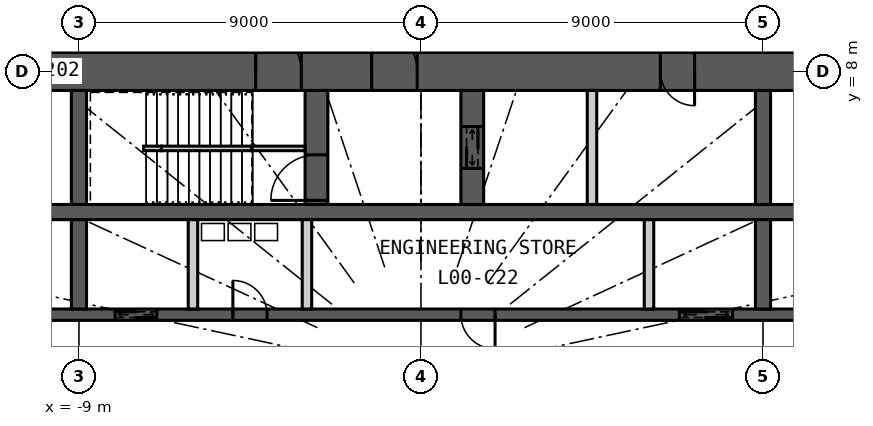
"""IFC4 building model, lengths in metres.
Left out: names, types, materials, properties, quantities, classifications, styles, units other than length and angle.
Written with IfcOpenShell. Run it as: python <this file> out.ifc"""

import sys

from ifc_helpers import new_model, si_unit, direction, frame, frame_2d, origin, place, context, subcontext, project, spatial, rectangle, extrude, element, fill, save


model = new_model("IFC4")
c1 = context("Model", 3, precision=1e-05, world=origin(), true_north=direction((0.0, 1.0)))
c2 = subcontext(c1, "Body", "Model", "MODEL_VIEW")
j1 = project(units=[si_unit("LENGTHUNIT", "METRE"), si_unit("PLANEANGLEUNIT", "RADIAN")], contexts=[c1])
p1 = place(None, origin())
s1 = spatial("IfcSite", under=j1, at=p1, CompositionType="ELEMENT")
p2 = place(p1, origin())
s2 = spatial("IfcBuilding", under=s1, at=p2, CompositionType="ELEMENT")
p3 = place(p2, origin())
s3 = spatial("IfcBuildingStorey", under=s2, at=p3, CompositionType="ELEMENT", Elevation=0.0)
p4 = place(p3, frame((-12.5, 8.0, 0.0), z_axis=(0.0, 0.0, 1.0), x_axis=(1.0, 0.0, 0.0)))
e1 = element("IfcWall", 1, at=p4, inside=s3, PredefinedType="SHEAR", context=c2, shape_type="SweptSolid", body=[
    extrude(rectangle(XDim=25.0, YDim=1.0, at=frame_2d((12.5, 0.0))), origin(), (0.0, 0.0, 1.0), 7.2),
])
p5 = place(p4, frame((11.2, 0.0, 0.0)))
e2 = element("IfcOpeningElement", 2, at=p5, cuts=e1, PredefinedType="OPENING", context=c2, shape_type="SweptSolid", body=[
    extrude(rectangle(XDim=1.2, YDim=2.2, at=frame_2d((0.6, 1.1))), frame((0.0, 0.51, 0.0), z_axis=(0.0, -1.0, 0.0), x_axis=(1.0, 0.0, 0.0)), (0.0, 0.0, 1.0), 1.02),
])
p6 = place(p4, frame((8.15, 0.0, 0.0)))
e3 = element("IfcOpeningElement", 3, at=p6, cuts=e1, PredefinedType="OPENING", context=c2, shape_type="SweptSolid", body=[
    extrude(rectangle(XDim=1.2, YDim=2.2, at=frame_2d((0.6, 1.1))), frame((0.0, 0.51, 0.0), z_axis=(0.0, -1.0, 0.0), x_axis=(1.0, 0.0, 0.0)), (0.0, 0.0, 1.0), 1.02),
])
p7 = place(p4, frame((18.8, 0.0, 0.0)))
e4 = element("IfcOpeningElement", 4, at=p7, cuts=e1, PredefinedType="OPENING", context=c2, shape_type="SweptSolid", body=[
    extrude(rectangle(XDim=0.9, YDim=2.2, at=frame_2d((0.45, 1.1))), frame((0.0, 0.51, 0.0), z_axis=(0.0, -1.0, 0.0), x_axis=(1.0, 0.0, 0.0)), (0.0, 0.0, 1.0), 1.02),
])
p8 = place(p3, frame((-11.5, 4.3, 0.0), z_axis=(0.0, 0.0, 1.0), x_axis=(1.0, 0.0, 0.0)))
e5 = element("IfcWall", 5, at=p8, inside=s3, PredefinedType="SHEAR", context=c2, shape_type="SweptSolid", body=[
    extrude(rectangle(XDim=23.0, YDim=0.4, at=frame_2d((11.5, 0.0))), origin(), (0.0, 0.0, 1.0), 7.2),
])
p9 = place(p3, frame((-11.5, 1.6, 0.0), z_axis=(0.0, 0.0, 1.0), x_axis=(1.0, 0.0, 0.0)))
e6 = element("IfcWall", 6, at=p9, inside=s3, PredefinedType="SHEAR", context=c2, shape_type="SweptSolid", body=[
    extrude(rectangle(XDim=23.0, YDim=0.3, at=frame_2d((11.5, 0.0))), origin(), (0.0, 0.0, 1.0), 7.2),
])
p10 = place(p9, frame((0.45, 0.0, 0.0)))
e7 = element("IfcOpeningElement", 7, at=p10, cuts=e6, PredefinedType="OPENING", context=c2, shape_type="SweptSolid", body=[
    extrude(rectangle(XDim=1.1, YDim=2.2, at=frame_2d((0.55, 1.1))), frame((0.0, 0.16, 0.0), z_axis=(0.0, -1.0, 0.0), x_axis=(1.0, 0.0, 0.0)), (0.0, 0.0, 1.0), 0.32),
])
p11 = place(p9, frame((3.45, 0.0, 0.0)))
e8 = element("IfcOpeningElement", 8, at=p11, cuts=e6, PredefinedType="OPENING", context=c2, shape_type="SweptSolid", body=[
    extrude(rectangle(XDim=1.1, YDim=2.2, at=frame_2d((0.55, 1.1))), frame((0.0, 0.16, 0.0), z_axis=(0.0, -1.0, 0.0), x_axis=(1.0, 0.0, 0.0)), (0.0, 0.0, 1.0), 0.32),
])
p12 = place(p9, frame((18.3, 0.0, 0.0)))
e9 = element("IfcOpeningElement", 9, at=p12, cuts=e6, PredefinedType="OPENING", context=c2, shape_type="SweptSolid", body=[
    extrude(rectangle(XDim=1.4, YDim=2.4, at=frame_2d((0.7, 1.2))), frame((0.0, 0.16, 0.0), z_axis=(0.0, -1.0, 0.0), x_axis=(1.0, 0.0, 0.0)), (0.0, 0.0, 1.0), 0.32),
])
p13 = place(p9, frame((21.45, 0.0, 0.0)))
e10 = element("IfcOpeningElement", 10, at=p13, cuts=e6, PredefinedType="OPENING", context=c2, shape_type="SweptSolid", body=[
    extrude(rectangle(XDim=1.1, YDim=2.2, at=frame_2d((0.55, 1.1))), frame((0.0, 0.16, 0.0), z_axis=(0.0, -1.0, 0.0), x_axis=(1.0, 0.0, 0.0)), (0.0, 0.0, 1.0), 0.32),
])
p14 = place(p9, frame((6.55, 0.0, 0.0)))
e11 = element("IfcOpeningElement", 11, at=p14, cuts=e6, PredefinedType="OPENING", context=c2, shape_type="SweptSolid", body=[
    extrude(rectangle(XDim=0.9, YDim=2.2, at=frame_2d((0.45, 1.1))), frame((0.0, 0.16, 0.0), z_axis=(0.0, -1.0, 0.0), x_axis=(1.0, 0.0, 0.0)), (0.0, 0.0, 1.0), 0.32),
])
p15 = place(p9, frame((12.55, 0.0, 0.0)))
e12 = element("IfcOpeningElement", 12, at=p15, cuts=e6, PredefinedType="OPENING", context=c2, shape_type="SweptSolid", body=[
    extrude(rectangle(XDim=0.9, YDim=2.2, at=frame_2d((0.45, 1.1))), frame((0.0, 0.16, 0.0), z_axis=(0.0, -1.0, 0.0), x_axis=(1.0, 0.0, 0.0)), (0.0, 0.0, 1.0), 0.32),
])
p16 = place(p3, frame((-9.0, 4.5, 0.0), z_axis=(0.0, 0.0, 1.0), x_axis=(0.0, 1.0, 0.0)))
e13 = element("IfcWall", 13, at=p16, inside=s3, PredefinedType="SHEAR", context=c2, shape_type="SweptSolid", body=[
    extrude(rectangle(XDim=3.0, YDim=0.4, at=frame_2d((1.5, 0.0))), origin(), (0.0, 0.0, 1.0), 7.2),
])
p17 = place(p3, frame((-9.0, 1.75, 0.0), z_axis=(0.0, 0.0, 1.0), x_axis=(0.0, 1.0, 0.0)))
e14 = element("IfcWall", 14, at=p17, inside=s3, PredefinedType="SHEAR", context=c2, shape_type="SweptSolid", body=[
    extrude(rectangle(XDim=2.35, YDim=0.4, at=frame_2d((1.175, 0.0))), origin(), (0.0, 0.0, 1.0), 7.2),
])
p18 = place(p3, frame((9.0, 4.5, 0.0), z_axis=(0.0, 0.0, 1.0), x_axis=(0.0, 1.0, 0.0)))
e15 = element("IfcWall", 15, at=p18, inside=s3, PredefinedType="SHEAR", context=c2, shape_type="SweptSolid", body=[
    extrude(rectangle(XDim=3.0, YDim=0.4, at=frame_2d((1.5, 0.0))), origin(), (0.0, 0.0, 1.0), 7.2),
])
p19 = place(p3, frame((9.0, 1.75, 0.0), z_axis=(0.0, 0.0, 1.0), x_axis=(0.0, 1.0, 0.0)))
e16 = element("IfcWall", 16, at=p19, inside=s3, PredefinedType="SHEAR", context=c2, shape_type="SweptSolid", body=[
    extrude(rectangle(XDim=2.35, YDim=0.4, at=frame_2d((1.175, 0.0))), origin(), (0.0, 0.0, 1.0), 7.2),
])
p20 = place(p3, frame((-2.75, 7.5, 0.0), z_axis=(0.0, 0.0, 1.0), x_axis=(0.0, -1.0, 0.0)))
e17 = element("IfcWall", 17, at=p20, inside=s3, PredefinedType="SHEAR", context=c2, shape_type="SweptSolid", body=[
    extrude(rectangle(XDim=3.0, YDim=0.6, at=frame_2d((1.5, 0.0))), origin(), (0.0, 0.0, 1.0), 7.2),
])
p21 = place(p20, frame((1.692, 0.0, 0.0)))
e18 = element("IfcOpeningElement", 18, at=p21, cuts=e17, PredefinedType="OPENING", context=c2, shape_type="SweptSolid", body=[
    extrude(rectangle(XDim=1.2, YDim=2.2, at=frame_2d((0.6, 1.1))), frame((0.0, 0.31, 0.0), z_axis=(0.0, -1.0, 0.0), x_axis=(1.0, 0.0, 0.0)), (0.0, 0.0, 1.0), 0.62),
])
p22 = place(p3, frame((1.35, 4.5, 0.0), z_axis=(0.0, 0.0, 1.0), x_axis=(0.0, 1.0, 0.0)))
e19 = element("IfcWall", 19, at=p22, inside=s3, PredefinedType="SHEAR", context=c2, shape_type="SweptSolid", body=[
    extrude(rectangle(XDim=3.0, YDim=0.6, at=frame_2d((1.5, 0.0))), origin(), (0.0, 0.0, 1.0), 7.2),
])
p23 = place(p22, frame((0.95, 0.0, 0.0)))
e20 = element("IfcOpeningElement", 20, at=p23, cuts=e19, PredefinedType="OPENING", context=c2, shape_type="SweptSolid", body=[
    extrude(rectangle(XDim=1.1, YDim=2.2, at=frame_2d((0.55, 1.1))), frame((0.0, 0.31, 0.0), z_axis=(0.0, -1.0, 0.0), x_axis=(1.0, 0.0, 0.0)), (0.0, 0.0, 1.0), 0.62),
])
p24 = place(p3, frame((4.5, 4.5, 0.0), z_axis=(0.0, 0.0, 1.0), x_axis=(0.0, 1.0, 0.0)))
e21 = element("IfcWall", 21, at=p24, inside=s3, PredefinedType="PARTITIONING", context=c2, shape_type="SweptSolid", body=[
    extrude(rectangle(XDim=3.0, YDim=0.25, at=frame_2d((1.5, 0.0))), origin(), (0.0, 0.0, 1.0), 7.2),
])
for number, where, z_axis, x_axis in (
    (22, (-6.0, 1.75, 0.0), (0.0, 0.0, 1.0), (0.0, 1.0, 0.0)),
    (23, (-3.0, 1.75, 0.0), (0.0, 0.0, 1.0), (0.0, 1.0, 0.0)),
    (24, (6.0, 1.75, 0.0), (0.0, 0.0, 1.0), (0.0, 1.0, 0.0)),
):
    element("IfcWall", number, at=place(p3, frame(where, z_axis=z_axis, x_axis=x_axis)), inside=s3, PredefinedType="PARTITIONING", context=c2, shape_type="SweptSolid", body=[
        extrude(rectangle(XDim=2.35, YDim=0.25, at=frame_2d((1.175, 0.0))), origin(), (0.0, 0.0, 1.0), 7.2),
    ])
p25 = place(p3, frame((-6.83, 5.975, -0.5), z_axis=(0.0, 0.0, 1.0), x_axis=(1.0, 0.0, 0.0)))
e25 = element("IfcWall", 25, at=p25, inside=s3, PredefinedType="PARTITIONING", context=c2, shape_type="SweptSolid", body=[
    extrude(rectangle(XDim=2.38, YDim=0.12, at=frame_2d((1.19, 0.0))), origin(), (0.0, 0.0, 1.0), 4.3),
])
p26 = place(p3, frame((-4.45, 5.975, 0.0), z_axis=(0.0, 0.0, 1.0), x_axis=(1.0, 0.0, 0.0)))
e26 = element("IfcWall", 26, at=p26, inside=s3, PredefinedType="PARTITIONING", context=c2, shape_type="SweptSolid", body=[
    extrude(rectangle(XDim=1.4, YDim=0.12, at=frame_2d((0.7, 0.0))), origin(), (0.0, 0.0, 1.0), 3.35),
])
p27 = place(p3, frame((-7.3, 5.975, 1.129), z_axis=(0.0, 0.0, 1.0), x_axis=(1.0, 0.0, 0.0)))
e27 = element("IfcWall", 27, at=p27, inside=s3, PredefinedType="PARTITIONING", context=c2, shape_type="SweptSolid", body=[
    extrude(rectangle(XDim=0.47, YDim=0.12, at=frame_2d((0.235, 0.0))), origin(), (0.0, 0.0, 1.0), 2.671),
])
p28 = place(p5, origin())
e28 = element("IfcDoor", 28, at=p28, inside=s3, OperationType="SINGLE_SWING_LEFT", PredefinedType="DOOR", context=c2, shape_type="SweptSolid", body=[
    extrude(rectangle(XDim=1.2, YDim=2.2, at=frame_2d((0.6, 1.1))), frame((0.0, 0.025, 0.0), z_axis=(0.0, -1.0, 0.0), x_axis=(1.0, 0.0, 0.0)), (0.0, 0.0, 1.0), 0.05),
])
fill(e2, e28)
p29 = place(p21, origin())
e29 = element("IfcDoor", 29, at=p29, inside=s3, OperationType="SINGLE_SWING_RIGHT", PredefinedType="DOOR", context=c2, shape_type="SweptSolid", body=[
    extrude(rectangle(XDim=1.2, YDim=2.2, at=frame_2d((0.6, 1.1))), frame((0.0, 0.025, 0.0), z_axis=(0.0, -1.0, 0.0), x_axis=(1.0, 0.0, 0.0)), (0.0, 0.0, 1.0), 0.05),
])
fill(e18, e29)
p30 = place(p6, origin())
e30 = element("IfcDoor", 30, at=p30, inside=s3, OperationType="SINGLE_SWING_LEFT", PredefinedType="DOOR", context=c2, shape_type="SweptSolid", body=[
    extrude(rectangle(XDim=1.2, YDim=2.2, at=frame_2d((0.6, 1.1))), frame((0.0, 0.025, 0.0), z_axis=(0.0, -1.0, 0.0), x_axis=(1.0, 0.0, 0.0)), (0.0, 0.0, 1.0), 0.05),
])
fill(e3, e30)
p31 = place(p23, origin())
e31 = element("IfcDoor", 31, at=p31, inside=s3, OperationType="DOUBLE_DOOR_SLIDING", PredefinedType="DOOR", context=c2, shape_type="SweptSolid", body=[
    extrude(rectangle(XDim=1.1, YDim=2.2, at=frame_2d((0.55, 1.1))), frame((0.0, 0.025, 0.0), z_axis=(0.0, -1.0, 0.0), x_axis=(1.0, 0.0, 0.0)), (0.0, 0.0, 1.0), 0.05),
])
fill(e20, e31)
p32 = place(p7, origin())
e32 = element("IfcDoor", 32, at=p32, inside=s3, OperationType="SINGLE_SWING_RIGHT", PredefinedType="DOOR", context=c2, shape_type="SweptSolid", body=[
    extrude(rectangle(XDim=0.9, YDim=2.2, at=frame_2d((0.45, 1.1))), frame((0.0, 0.025, 0.0), z_axis=(0.0, -1.0, 0.0), x_axis=(1.0, 0.0, 0.0)), (0.0, 0.0, 1.0), 0.05),
])
fill(e4, e32)
p33 = place(p11, origin())
e33 = element("IfcDoor", 33, at=p33, inside=s3, OperationType="DOUBLE_DOOR_SLIDING", PredefinedType="DOOR", context=c2, shape_type="SweptSolid", body=[
    extrude(rectangle(XDim=1.1, YDim=2.2, at=frame_2d((0.55, 1.1))), frame((0.0, 0.025, 0.0), z_axis=(0.0, -1.0, 0.0), x_axis=(1.0, 0.0, 0.0)), (0.0, 0.0, 1.0), 0.05),
])
fill(e8, e33)
p34 = place(p12, origin())
e34 = element("IfcDoor", 34, at=p34, inside=s3, OperationType="DOUBLE_DOOR_SLIDING", PredefinedType="DOOR", context=c2, shape_type="SweptSolid", body=[
    extrude(rectangle(XDim=1.4, YDim=2.4, at=frame_2d((0.7, 1.2))), frame((0.0, 0.025, 0.0), z_axis=(0.0, -1.0, 0.0), x_axis=(1.0, 0.0, 0.0)), (0.0, 0.0, 1.0), 0.05),
])
fill(e9, e34)
p35 = place(p14, origin())
e35 = element("IfcDoor", 35, at=p35, inside=s3, OperationType="SINGLE_SWING_LEFT", PredefinedType="DOOR", context=c2, shape_type="SweptSolid", body=[
    extrude(rectangle(XDim=0.9, YDim=2.2, at=frame_2d((0.45, 1.1))), frame((0.0, 0.025, 0.0), z_axis=(0.0, -1.0, 0.0), x_axis=(1.0, 0.0, 0.0)), (0.0, 0.0, 1.0), 0.05),
])
fill(e11, e35)
p36 = place(p15, origin())
e36 = element("IfcDoor", 36, at=p36, inside=s3, OperationType="SINGLE_SWING_RIGHT", PredefinedType="DOOR", context=c2, shape_type="SweptSolid", body=[
    extrude(rectangle(XDim=0.9, YDim=2.2, at=frame_2d((0.45, 1.1))), frame((0.0, 0.025, 0.0), z_axis=(0.0, -1.0, 0.0), x_axis=(1.0, 0.0, 0.0)), (0.0, 0.0, 1.0), 0.05),
])
fill(e12, e36)
save(model, sys.argv[1])
